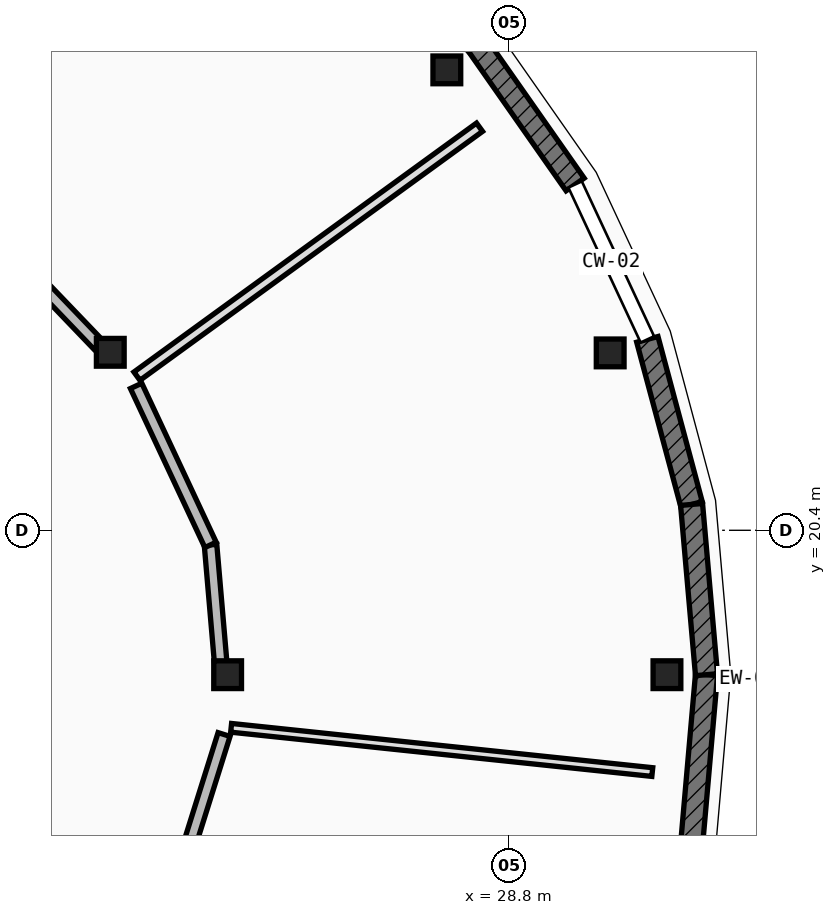
"""IFC4 building model, lengths in metres.
Left out: names, types, materials, properties, quantities, classifications, styles, units other than length and angle.
Written with IfcOpenShell. Run it as: python <this file> out.ifc"""

import sys

from ifc_helpers import new_model, si_unit, direction, frame, frame_2d, origin, origin_2d, place, context, subcontext, project, spatial, rectangle, extrude, element, fill, save


model = new_model("IFC4")
c1 = context("Model", 3, precision=1e-05, world=origin(), true_north=direction((0.0, 1.0)))
c2 = subcontext(c1, "Body", "Model", "MODEL_VIEW")
j1 = project(units=[si_unit("LENGTHUNIT", "METRE"), si_unit("PLANEANGLEUNIT", "RADIAN")], contexts=[c1])
p1 = place(None, origin())
s1 = spatial("IfcSite", under=j1, at=p1, CompositionType="ELEMENT")
p2 = place(p1, origin())
s2 = spatial("IfcBuilding", under=s1, at=p2, CompositionType="ELEMENT")
p3 = place(p2, frame((0.0, 0.0, 8.75)))
s3 = spatial("IfcBuildingStorey", under=s2, at=p3, CompositionType="ELEMENT", Elevation=8.75)
for number, where, z_axis, x_axis in (
    (1, (30.88, 18.5, 0.0), (0.0, 0.0, 1.0), (1.0, 0.0, 0.0)),
    (2, (30.133, 22.734, 0.0), (0.0, 0.0, 1.0), (1.0, 0.0, 0.0)),
    (3, (27.984, 26.458, 0.0), (0.0, 0.0, 1.0), (1.0, 0.0, 0.0)),
    (4, (25.1, 18.5, 0.0), (0.0, 0.0, 1.0), (1.0, 0.0, 0.0)),
    (5, (23.556, 22.742, 0.0), (0.0, 0.0, 1.0), (1.0, 0.0, 0.0)),
):
    element("IfcColumn", number, at=place(p3, frame(where, z_axis=z_axis, x_axis=x_axis)), inside=s3, PredefinedType="COLUMN", context=c2, shape_type="SweptSolid", body=[
        extrude(rectangle(XDim=0.365, YDim=0.365, at=origin_2d()), origin(), (0.0, 0.0, 1.0), 4.2),
    ])
p4 = place(p3, frame((31.4, 18.5, 0.0), z_axis=(0.0, 0.0, 1.0), x_axis=(-0.087079400775, -0.996201374201, 0.0)))
e6 = element("IfcWall", 6, at=p4, inside=s3, PredefinedType="ELEMENTEDWALL", context=c2, shape_type="SweptSolid", body=[
    extrude(rectangle(XDim=2.249, YDim=0.29, at=frame_2d((1.124, 0.0))), origin(), (0.0, 0.0, 1.0), 3.329),
])
p5 = place(p4, frame((0.474, 0.0, 0.7)))
e7 = element("IfcOpeningElement", 7, at=p5, cuts=e6, PredefinedType="OPENING", context=c2, shape_type="SweptSolid", body=[
    extrude(rectangle(XDim=1.3, YDim=2.3, at=frame_2d((0.65, 1.15))), frame((0.0, 0.155, 0.0), z_axis=(0.0, -1.0, 0.0), x_axis=(1.0, 0.0, 0.0)), (0.0, 0.0, 1.0), 0.31),
])
p6 = place(p3, frame((26.792, 28.382, 0.0), z_axis=(0.0, 0.0, 1.0), x_axis=(0.707106781187, -0.707106781187, 0.0)))
e8 = element("IfcWall", 8, at=p6, inside=s3, PredefinedType="ELEMENTEDWALL", context=c2, shape_type="SweptSolid", body=[
    extrude(rectangle(XDim=2.249, YDim=0.29, at=frame_2d((1.125, 0.0))), origin(), (0.0, 0.0, 1.0), 3.329),
])
p7 = place(p6, frame((0.699, 0.0, 0.85)))
e9 = element("IfcOpeningElement", 9, at=p7, cuts=e8, PredefinedType="OPENING", context=c2, shape_type="SweptSolid", body=[
    extrude(rectangle(XDim=0.85, YDim=1.5, at=frame_2d((0.425, 0.75))), frame((0.0, 0.155, 0.0), z_axis=(0.0, -1.0, 0.0), x_axis=(1.0, 0.0, 0.0)), (0.0, 0.0, 1.0), 0.31),
])
p8 = place(p3, frame((28.382, 26.792, 0.0), z_axis=(0.0, 0.0, 1.0), x_axis=(0.573644482107, -0.819104393925, 0.0)))
e10 = element("IfcWall", 10, at=p8, inside=s3, PredefinedType="ELEMENTEDWALL", context=c2, shape_type="SweptSolid", body=[
    extrude(rectangle(XDim=2.249, YDim=0.29, at=frame_2d((1.125, 0.0))), origin(), (0.0, 0.0, 1.0), 3.329),
])
p9 = place(p8, frame((0.699, 0.0, 0.85)))
e11 = element("IfcOpeningElement", 11, at=p9, cuts=e10, PredefinedType="OPENING", context=c2, shape_type="SweptSolid", body=[
    extrude(rectangle(XDim=0.85, YDim=1.75, at=frame_2d((0.425, 0.875))), frame((0.0, 0.155, 0.0), z_axis=(0.0, -1.0, 0.0), x_axis=(1.0, 0.0, 0.0)), (0.0, 0.0, 1.0), 0.31),
])
p10 = place(p3, frame((30.622, 22.912, 0.0), z_axis=(0.0, 0.0, 1.0), x_axis=(0.258824721145, -0.96592430538, 0.0)))
e12 = element("IfcWall", 12, at=p10, inside=s3, PredefinedType="ELEMENTEDWALL", context=c2, shape_type="SweptSolid", body=[
    extrude(rectangle(XDim=2.249, YDim=0.29, at=frame_2d((1.125, 0.0))), origin(), (0.0, 0.0, 1.0), 3.329),
])
p11 = place(p10, frame((0.684, 0.0, 0.85)))
e13 = element("IfcOpeningElement", 13, at=p11, cuts=e12, PredefinedType="OPENING", context=c2, shape_type="SweptSolid", body=[
    extrude(rectangle(XDim=0.88, YDim=1.6, at=frame_2d((0.44, 0.8))), frame((0.0, 0.155, 0.0), z_axis=(0.0, -1.0, 0.0), x_axis=(1.0, 0.0, 0.0)), (0.0, 0.0, 1.0), 0.31),
])
p12 = place(p3, frame((31.204, 20.74, 0.0), z_axis=(0.0, 0.0, 1.0), x_axis=(0.087079400775, -0.996201374201, 0.0)))
e14 = element("IfcWall", 14, at=p12, inside=s3, PredefinedType="ELEMENTEDWALL", context=c2, shape_type="SweptSolid", body=[
    extrude(rectangle(XDim=2.249, YDim=0.29, at=frame_2d((1.124, 0.0))), origin(), (0.0, 0.0, 1.0), 3.329),
])
p13 = place(p12, frame((0.674, 0.0, 0.85)))
e15 = element("IfcOpeningElement", 15, at=p13, cuts=e14, PredefinedType="OPENING", context=c2, shape_type="SweptSolid", body=[
    extrude(rectangle(XDim=0.9, YDim=1.4, at=frame_2d((0.45, 0.7))), frame((0.0, 0.155, 0.0), z_axis=(0.0, -1.0, 0.0), x_axis=(1.0, 0.0, 0.0)), (0.0, 0.0, 1.0), 0.31),
])
p14 = place(p3, frame((25.146, 17.801, 0.0), z_axis=(0.0, 0.0, 1.0), x_axis=(0.994528479097, -0.10446580429, 0.0)))
e16 = element("IfcWall", 16, at=p14, inside=s3, PredefinedType="PARTITIONING", context=c2, shape_type="SweptSolid", body=[
    extrude(rectangle(XDim=5.572, YDim=0.115, at=frame_2d((2.786, 0.0))), origin(), (0.0, 0.0, 1.0), 3.304),
])
p15 = place(p3, frame((23.907, 22.428, 0.0), z_axis=(0.0, 0.0, 1.0), x_axis=(0.808989937146, 0.58782249157, 0.0)))
e17 = element("IfcWall", 17, at=p15, inside=s3, PredefinedType="PLUMBINGWALL", context=c2, shape_type="SweptSolid", body=[
    extrude(rectangle(XDim=5.571, YDim=0.135, at=frame_2d((2.786, 0.0))), origin(), (0.0, 0.0, 1.0), 3.304),
])
p16 = place(p3, frame((21.111, 24.652, 0.0), z_axis=(0.0, 0.0, 1.0), x_axis=(0.390762345339, 0.920491602061, 0.0)))
e18 = element("IfcWall", 18, at=p16, inside=s3, PredefinedType="PLUMBINGWALL", context=c2, shape_type="SweptSolid", body=[
    extrude(rectangle(XDim=5.576, YDim=0.135, at=frame_2d((2.788, 0.0))), origin(), (0.0, 0.0, 1.0), 3.304),
])
p17 = place(p3, frame((24.327, 15.401, 0.0), z_axis=(0.0, 0.0, 1.0), x_axis=(0.299617014986, 0.954059560159, 0.0)))
e19 = element("IfcWall", 19, at=p17, inside=s3, PredefinedType="PARTITIONING", context=c2, shape_type="SweptSolid", body=[
    extrude(rectangle(XDim=2.423, YDim=0.165, at=frame_2d((1.212, 0.0))), origin(), (0.0, 0.0, 1.0), 3.304),
])
p18 = place(p17, frame((0.621, 0.0, 0.0)))
e20 = element("IfcOpeningElement", 20, at=p18, cuts=e19, PredefinedType="OPENING", context=c2, shape_type="SweptSolid", body=[
    extrude(rectangle(XDim=1.18, YDim=2.2, at=frame_2d((0.59, 1.1))), frame((0.0, 0.093, 0.0), z_axis=(0.0, -1.0, 0.0), x_axis=(1.0, 0.0, 0.0)), (0.0, 0.0, 1.0), 0.185),
])
p19 = place(p3, frame((25.008, 18.663, 0.0), z_axis=(0.0, 0.0, 1.0), x_axis=(-0.085807505565, 0.996311734343, 0.0)))
e21 = element("IfcWall", 21, at=p19, inside=s3, PredefinedType="PARTITIONING", context=c2, shape_type="SweptSolid", body=[
    extrude(rectangle(XDim=1.551, YDim=0.165, at=frame_2d((0.775, 0.0))), origin(), (0.0, 0.0, 1.0), 3.304),
])
p20 = place(p19, frame((0.3, 0.0, 0.0)))
e22 = element("IfcOpeningElement", 22, at=p20, cuts=e21, PredefinedType="OPENING", context=c2, shape_type="SweptSolid", body=[
    extrude(rectangle(XDim=0.95, YDim=2.16, at=frame_2d((0.475, 1.08))), frame((0.0, 0.093, 0.0), z_axis=(0.0, -1.0, 0.0), x_axis=(1.0, 0.0, 0.0)), (0.0, 0.0, 1.0), 0.185),
])
p21 = place(p3, frame((24.875, 20.208, 0.0), z_axis=(0.0, 0.0, 1.0), x_axis=(-0.423851557369, 0.9057316696, 0.0)))
e23 = element("IfcWall", 23, at=p21, inside=s3, PredefinedType="PARTITIONING", context=c2, shape_type="SweptSolid", body=[
    extrude(rectangle(XDim=2.31, YDim=0.165, at=frame_2d((1.155, 0.0))), origin(), (0.0, 0.0, 1.0), 3.304),
])
p22 = place(p3, frame((23.398, 22.842, 0.0), z_axis=(0.0, 0.0, 1.0), x_axis=(-0.692068123198, 0.721832191616, 0.0)))
e24 = element("IfcWall", 24, at=p22, inside=s3, PredefinedType="PARTITIONING", context=c2, shape_type="SweptSolid", body=[
    extrude(rectangle(XDim=1.14, YDim=0.165, at=frame_2d((0.57, 0.0))), origin(), (0.0, 0.0, 1.0), 3.304),
])
p23 = place(p5, origin())
e25 = element("IfcWindow", 25, at=p23, inside=s3, PartitioningType="SINGLE_PANEL", PredefinedType="WINDOW", context=c2, shape_type="SweptSolid", body=[
    extrude(rectangle(XDim=1.3, YDim=2.3, at=frame_2d((0.65, 1.15))), frame((0.0, 0.03, 0.0), z_axis=(0.0, -1.0, 0.0), x_axis=(1.0, 0.0, 0.0)), (0.0, 0.0, 1.0), 0.06),
])
fill(e7, e25)
p24 = place(p9, origin())
e26 = element("IfcWindow", 26, at=p24, inside=s3, PartitioningType="SINGLE_PANEL", PredefinedType="WINDOW", context=c2, shape_type="SweptSolid", body=[
    extrude(rectangle(XDim=0.85, YDim=1.75, at=frame_2d((0.425, 0.875))), frame((0.0, 0.03, 0.0), z_axis=(0.0, -1.0, 0.0), x_axis=(1.0, 0.0, 0.0)), (0.0, 0.0, 1.0), 0.06),
])
fill(e11, e26)
p25 = place(p11, origin())
e27 = element("IfcWindow", 27, at=p25, inside=s3, PartitioningType="SINGLE_PANEL", PredefinedType="WINDOW", context=c2, shape_type="SweptSolid", body=[
    extrude(rectangle(XDim=0.88, YDim=1.6, at=frame_2d((0.44, 0.8))), frame((0.0, 0.03, 0.0), z_axis=(0.0, -1.0, 0.0), x_axis=(1.0, 0.0, 0.0)), (0.0, 0.0, 1.0), 0.06),
])
fill(e13, e27)
p26 = place(p13, origin())
e28 = element("IfcWindow", 28, at=p26, inside=s3, PartitioningType="SINGLE_PANEL", PredefinedType="WINDOW", context=c2, shape_type="SweptSolid", body=[
    extrude(rectangle(XDim=0.9, YDim=1.4, at=frame_2d((0.45, 0.7))), frame((0.0, 0.03, 0.0), z_axis=(0.0, -1.0, 0.0), x_axis=(1.0, 0.0, 0.0)), (0.0, 0.0, 1.0), 0.06),
])
fill(e15, e28)
p27 = place(p18, origin())
e29 = element("IfcDoor", 29, at=p27, inside=s3, OperationType="SINGLE_SWING_LEFT", PredefinedType="DOOR", context=c2, shape_type="SweptSolid", body=[
    extrude(rectangle(XDim=1.18, YDim=2.2, at=frame_2d((0.59, 1.1))), frame((0.0, 0.025, 0.0), z_axis=(0.0, -1.0, 0.0), x_axis=(1.0, 0.0, 0.0)), (0.0, 0.0, 1.0), 0.05),
])
fill(e20, e29)
p28 = place(p20, origin())
e30 = element("IfcDoor", 30, at=p28, inside=s3, OperationType="SINGLE_SWING_RIGHT", PredefinedType="DOOR", context=c2, shape_type="SweptSolid", body=[
    extrude(rectangle(XDim=0.95, YDim=2.16, at=frame_2d((0.475, 1.08))), frame((0.0, 0.025, 0.0), z_axis=(0.0, -1.0, 0.0), x_axis=(1.0, 0.0, 0.0)), (0.0, 0.0, 1.0), 0.05),
])
fill(e22, e30)
save(model, sys.argv[1])
